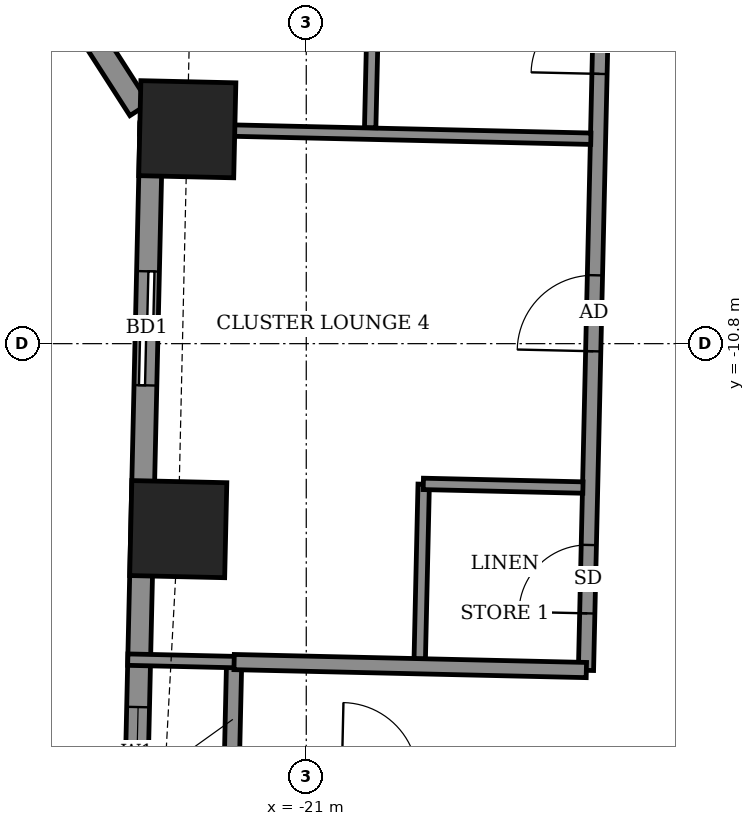
"""IFC4 building model, lengths in metres.
Left out: names, types, materials, properties, quantities, classifications, styles, units other than length and angle.
Written with IfcOpenShell. Run it as: python <this file> out.ifc"""

import sys

from ifc_helpers import new_model, si_unit, direction, frame, frame_2d, origin, origin_2d, place, context, subcontext, project, spatial, rectangle, extrude, element, fill, save


model = new_model("IFC4")
c1 = context("Model", 3, precision=1e-05, world=origin(), true_north=direction((0.0, 1.0)))
c2 = subcontext(c1, "Body", "Model", "MODEL_VIEW")
j1 = project(units=[si_unit("LENGTHUNIT", "METRE"), si_unit("PLANEANGLEUNIT", "RADIAN")], contexts=[c1])
p1 = place(None, origin())
s1 = spatial("IfcSite", under=j1, at=p1, CompositionType="ELEMENT")
p2 = place(p1, origin())
s2 = spatial("IfcBuilding", under=s1, at=p2, CompositionType="ELEMENT")
p3 = place(p2, frame((0.0, 0.0, 156.3)))
s3 = spatial("IfcBuildingStorey", under=s2, at=p3, CompositionType="ELEMENT", Elevation=156.3)
for number, where, z_axis, x_axis in (
    (1, (-22.565, -7.979, -0.55), (0.0, 0.0, 1.0), (-0.023, -1.0, 0.0)),
    (2, (-22.684, -13.24, -0.55), (0.0, 0.0, 1.0), (-0.023, -1.0, 0.0)),
):
    element("IfcColumn", number, at=place(p3, frame(where, z_axis=z_axis, x_axis=x_axis)), inside=s3, PredefinedType="COLUMN", context=c2, shape_type="SweptSolid", body=[
        extrude(rectangle(XDim=1.25, YDim=1.25, at=origin_2d()), origin(), (0.0, 0.0, 1.0), 3.6),
    ])
p4 = place(p3, frame((-25.123, -4.717, 0.0), z_axis=(0.0, 0.0, 1.0), x_axis=(0.54058467792, -0.841289608873, 0.0)))
e3 = element("IfcWall", 3, at=p4, inside=s3, PredefinedType="SOLIDWALL", context=c2, shape_type="SweptSolid", body=[
    extrude(rectangle(XDim=3.568, YDim=0.3, at=frame_2d((1.784, 0.0))), origin(), (0.0, 0.0, 1.0), 3.05),
])
p5 = place(p4, frame((0.338, 0.0, 0.9)))
e4 = element("IfcOpeningElement", 4, at=p5, cuts=e3, PredefinedType="OPENING", context=c2, shape_type="SweptSolid", body=[
    extrude(rectangle(XDim=1.2, YDim=1.5, at=frame_2d((0.6, 0.75))), frame((0.0, 0.16, 0.0), z_axis=(0.0, -1.0, 0.0), x_axis=(1.0, 0.0, 0.0)), (0.0, 0.0, 1.0), 0.32),
])
p6 = place(p3, frame((-23.038, -7.913, 0.0), z_axis=(0.0, 0.0, 1.0), x_axis=(-0.022705985163, -0.999742185885, 0.0)))
e5 = element("IfcWall", 5, at=p6, inside=s3, PredefinedType="SOLIDWALL", context=c2, shape_type="SweptSolid", body=[
    extrude(rectangle(XDim=10.43, YDim=0.3, at=frame_2d((5.215, 0.0))), origin(), (0.0, 0.0, 1.0), 3.05),
])
p7 = place(p6, frame((1.936, 0.0, 0.0)))
e6 = element("IfcOpeningElement", 6, at=p7, cuts=e5, PredefinedType="OPENING", context=c2, shape_type="SweptSolid", body=[
    extrude(rectangle(XDim=1.5, YDim=2.4, at=frame_2d((0.75, 1.2))), frame((0.0, 0.16, 0.0), z_axis=(0.0, -1.0, 0.0), x_axis=(1.0, 0.0, 0.0)), (0.0, 0.0, 1.0), 0.32),
])
p8 = place(p6, frame((7.67, 0.0, 0.9)))
e7 = element("IfcOpeningElement", 7, at=p8, cuts=e5, PredefinedType="OPENING", context=c2, shape_type="SweptSolid", body=[
    extrude(rectangle(XDim=1.2, YDim=1.5, at=frame_2d((0.6, 0.75))), frame((0.0, 0.16, 0.0), z_axis=(0.0, -1.0, 0.0), x_axis=(1.0, 0.0, 0.0)), (0.0, 0.0, 1.0), 0.32),
])
p9 = place(p3, frame((-21.983, -16.493, 0.0), z_axis=(0.0, 0.0, 1.0), x_axis=(0.022617910375, 0.999744182344, 0.0)))
e8 = element("IfcWall", 8, at=p9, inside=s3, PredefinedType="PARTITIONING", context=c2, shape_type="SweptSolid", body=[
    extrude(rectangle(XDim=1.5, YDim=0.2, at=frame_2d((0.75, 0.0))), origin(), (0.0, 0.0, 1.0), 3.05),
])
p10 = place(p3, frame((-19.507, -14.949, 0.0), z_axis=(0.0, 0.0, 1.0), x_axis=(0.022603288534, 0.999744513037, 0.0)))
e9 = element("IfcWall", 9, at=p10, inside=s3, PredefinedType="PARTITIONING", context=c2, shape_type="SweptSolid", body=[
    extrude(rectangle(XDim=2.301, YDim=0.15, at=frame_2d((1.15, 0.0))), origin(), (0.0, 0.0, 1.0), 3.05),
])
p11 = place(p3, frame((-17.32, -15.098, 0.0), z_axis=(0.0, 0.0, 1.0), x_axis=(0.022694293906, 0.999742451346, 0.0)))
e10 = element("IfcWall", 10, at=p11, inside=s3, PredefinedType="PARTITIONING", context=c2, shape_type="SweptSolid", body=[
    extrude(rectangle(XDim=28.024, YDim=0.2, at=frame_2d((14.012, 0.0))), origin(), (0.0, 0.0, 1.0), 3.05),
])
p12 = place(p11, frame((24.212, 0.0, 0.0)))
e11 = element("IfcOpeningElement", 11, at=p12, cuts=e10, PredefinedType="OPENING", context=c2, shape_type="SweptSolid", body=[
    extrude(rectangle(XDim=1.0, YDim=2.1, at=frame_2d((0.5, 1.05))), frame((0.0, 0.11, 0.0), z_axis=(0.0, -1.0, 0.0), x_axis=(1.0, 0.0, 0.0)), (0.0, 0.0, 1.0), 0.22),
])
p13 = place(p11, frame((26.374, 0.0, 0.0)))
e12 = element("IfcOpeningElement", 12, at=p13, cuts=e10, PredefinedType="OPENING", context=c2, shape_type="SweptSolid", body=[
    extrude(rectangle(XDim=0.9, YDim=2.1, at=frame_2d((0.45, 1.05))), frame((0.0, 0.11, 0.0), z_axis=(0.0, -1.0, 0.0), x_axis=(1.0, 0.0, 0.0)), (0.0, 0.0, 1.0), 0.22),
])
p14 = place(p11, frame((21.774, 0.0, 0.0)))
e13 = element("IfcOpeningElement", 13, at=p14, cuts=e10, PredefinedType="OPENING", context=c2, shape_type="SweptSolid", body=[
    extrude(rectangle(XDim=1.0, YDim=2.1, at=frame_2d((0.5, 1.05))), frame((0.0, 0.11, 0.0), z_axis=(0.0, -1.0, 0.0), x_axis=(1.0, 0.0, 0.0)), (0.0, 0.0, 1.0), 0.22),
])
p15 = place(p11, frame((18.65, 0.0, 0.0)))
e14 = element("IfcOpeningElement", 14, at=p15, cuts=e10, PredefinedType="OPENING", context=c2, shape_type="SweptSolid", body=[
    extrude(rectangle(XDim=1.0, YDim=2.1, at=frame_2d((0.5, 1.05))), frame((0.0, 0.11, 0.0), z_axis=(0.0, -1.0, 0.0), x_axis=(1.0, 0.0, 0.0)), (0.0, 0.0, 1.0), 0.22),
])
p16 = place(p11, frame((15.626, 0.0, 0.0)))
e15 = element("IfcOpeningElement", 15, at=p16, cuts=e10, PredefinedType="OPENING", context=c2, shape_type="SweptSolid", body=[
    extrude(rectangle(XDim=1.0, YDim=2.1, at=frame_2d((0.5, 1.05))), frame((0.0, 0.11, 0.0), z_axis=(0.0, -1.0, 0.0), x_axis=(1.0, 0.0, 0.0)), (0.0, 0.0, 1.0), 0.22),
])
p17 = place(p11, frame((12.557, 0.0, 0.0)))
e16 = element("IfcOpeningElement", 16, at=p17, cuts=e10, PredefinedType="OPENING", context=c2, shape_type="SweptSolid", body=[
    extrude(rectangle(XDim=1.0, YDim=2.1, at=frame_2d((0.5, 1.05))), frame((0.0, 0.11, 0.0), z_axis=(0.0, -1.0, 0.0), x_axis=(1.0, 0.0, 0.0)), (0.0, 0.0, 1.0), 0.22),
])
p18 = place(p11, frame((10.049, 0.0, 0.0)))
e17 = element("IfcOpeningElement", 17, at=p18, cuts=e10, PredefinedType="OPENING", context=c2, shape_type="SweptSolid", body=[
    extrude(rectangle(XDim=1.0, YDim=2.1, at=frame_2d((0.5, 1.05))), frame((0.0, 0.11, 0.0), z_axis=(0.0, -1.0, 0.0), x_axis=(1.0, 0.0, 0.0)), (0.0, 0.0, 1.0), 0.22),
])
p19 = place(p11, frame((7.849, 0.0, 0.0)))
e18 = element("IfcOpeningElement", 18, at=p19, cuts=e10, PredefinedType="OPENING", context=c2, shape_type="SweptSolid", body=[
    extrude(rectangle(XDim=0.9, YDim=2.1, at=frame_2d((0.45, 1.05))), frame((0.0, 0.11, 0.0), z_axis=(0.0, -1.0, 0.0), x_axis=(1.0, 0.0, 0.0)), (0.0, 0.0, 1.0), 0.22),
])
p20 = place(p11, frame((4.199, 0.0, 0.0)))
e19 = element("IfcOpeningElement", 19, at=p20, cuts=e10, PredefinedType="OPENING", context=c2, shape_type="SweptSolid", body=[
    extrude(rectangle(XDim=1.0, YDim=2.1, at=frame_2d((0.5, 1.05))), frame((0.0, 0.11, 0.0), z_axis=(0.0, -1.0, 0.0), x_axis=(1.0, 0.0, 0.0)), (0.0, 0.0, 1.0), 0.22),
])
p21 = place(p11, frame((0.75, 0.0, 0.0)))
e20 = element("IfcOpeningElement", 20, at=p21, cuts=e10, PredefinedType="OPENING", context=c2, shape_type="SweptSolid", body=[
    extrude(rectangle(XDim=0.9, YDim=2.1, at=frame_2d((0.45, 1.05))), frame((0.0, 0.11, 0.0), z_axis=(0.0, -1.0, 0.0), x_axis=(1.0, 0.0, 0.0)), (0.0, 0.0, 1.0), 0.22),
])
p22 = place(p3, frame((-23.348, -14.957, 0.0), z_axis=(0.0, 0.0, 1.0), x_axis=(0.999740216184, -0.022792545827, 0.0)))
e21 = element("IfcWall", 21, at=p22, inside=s3, PredefinedType="PARTITIONING", context=c2, shape_type="SweptSolid", body=[
    extrude(rectangle(XDim=1.403, YDim=0.15, at=frame_2d((0.702, 0.0))), origin(), (0.0, 0.0, 1.0), 2.55),
])
p23 = place(p3, frame((-21.949, -14.989, 0.0), z_axis=(0.0, 0.0, 1.0), x_axis=(0.999743491588, -0.022648422179, 0.0)))
e22 = element("IfcWall", 22, at=p23, inside=s3, PredefinedType="PARTITIONING", context=c2, shape_type="SweptSolid", body=[
    extrude(rectangle(XDim=4.635, YDim=0.2, at=frame_2d((2.318, 0.0))), origin(), (0.0, 0.0, 1.0), 3.05),
])
p24 = place(p3, frame((-19.46, -12.645, 0.0), z_axis=(0.0, 0.0, 1.0), x_axis=(0.999737799372, -0.022898307927, 0.0)))
e23 = element("IfcWall", 23, at=p24, inside=s3, PredefinedType="PARTITIONING", context=c2, shape_type="SweptSolid", body=[
    extrude(rectangle(XDim=2.1, YDim=0.15, at=frame_2d((1.05, 0.0))), origin(), (0.0, 0.0, 1.0), 3.05),
])
p25 = place(p3, frame((-23.19, -7.969, 0.0), z_axis=(0.0, 0.0, 1.0), x_axis=(0.999741261868, -0.022746633113, 0.0)))
e24 = element("IfcWall", 24, at=p25, inside=s3, PredefinedType="PARTITIONING", context=c2, shape_type="SweptSolid", body=[
    extrude(rectangle(XDim=5.935, YDim=0.15, at=frame_2d((2.968, 0.0))), origin(), (0.0, 0.0, 1.0), 3.05),
])
p26 = place(p3, frame((-20.159, -7.958, 0.0), z_axis=(0.0, 0.0, 1.0), x_axis=(0.022919108675, 0.999737322729, 0.0)))
e25 = element("IfcWall", 25, at=p26, inside=s3, PredefinedType="PARTITIONING", context=c2, shape_type="SweptSolid", body=[
    extrude(rectangle(XDim=2.525, YDim=0.15, at=frame_2d((1.262, 0.0))), origin(), (0.0, 0.0, 1.0), 3.05),
])
p27 = place(p7, origin())
e26 = element("IfcDoor", 26, at=p27, inside=s3, OperationType="SLIDING_TO_LEFT", PredefinedType="DOOR", context=c2, shape_type="SweptSolid", body=[
    extrude(rectangle(XDim=1.5, YDim=2.4, at=frame_2d((0.75, 1.2))), frame((0.0, 0.025, 0.0), z_axis=(0.0, -1.0, 0.0), x_axis=(1.0, 0.0, 0.0)), (0.0, 0.0, 1.0), 0.05),
])
fill(e6, e26)
p28 = place(p8, origin())
e27 = element("IfcWindow", 27, at=p28, inside=s3, PartitioningType="SINGLE_PANEL", PredefinedType="WINDOW", context=c2, shape_type="SweptSolid", body=[
    extrude(rectangle(XDim=1.2, YDim=1.5, at=frame_2d((0.6, 0.75))), frame((0.0, 0.03, 0.0), z_axis=(0.0, -1.0, 0.0), x_axis=(1.0, 0.0, 0.0)), (0.0, 0.0, 1.0), 0.06),
])
fill(e7, e27)
p29 = place(p19, origin())
e28 = element("IfcDoor", 28, at=p29, inside=s3, OperationType="SINGLE_SWING_RIGHT", PredefinedType="DOOR", context=c2, shape_type="SweptSolid", body=[
    extrude(rectangle(XDim=0.9, YDim=2.1, at=frame_2d((0.45, 1.05))), frame((0.0, 0.025, 0.0), z_axis=(0.0, -1.0, 0.0), x_axis=(1.0, 0.0, 0.0)), (0.0, 0.0, 1.0), 0.05),
])
fill(e18, e28)
p30 = place(p20, origin())
e29 = element("IfcDoor", 29, at=p30, inside=s3, OperationType="SINGLE_SWING_LEFT", PredefinedType="DOOR", context=c2, shape_type="SweptSolid", body=[
    extrude(rectangle(XDim=1.0, YDim=2.1, at=frame_2d((0.5, 1.05))), frame((0.0, 0.025, 0.0), z_axis=(0.0, -1.0, 0.0), x_axis=(1.0, 0.0, 0.0)), (0.0, 0.0, 1.0), 0.05),
])
fill(e19, e29)
p31 = place(p21, origin())
e30 = element("IfcDoor", 30, at=p31, inside=s3, OperationType="SINGLE_SWING_LEFT", PredefinedType="DOOR", context=c2, shape_type="SweptSolid", body=[
    extrude(rectangle(XDim=0.9, YDim=2.1, at=frame_2d((0.45, 1.05))), frame((0.0, 0.025, 0.0), z_axis=(0.0, -1.0, 0.0), x_axis=(1.0, 0.0, 0.0)), (0.0, 0.0, 1.0), 0.05),
])
fill(e20, e30)
save(model, sys.argv[1])
